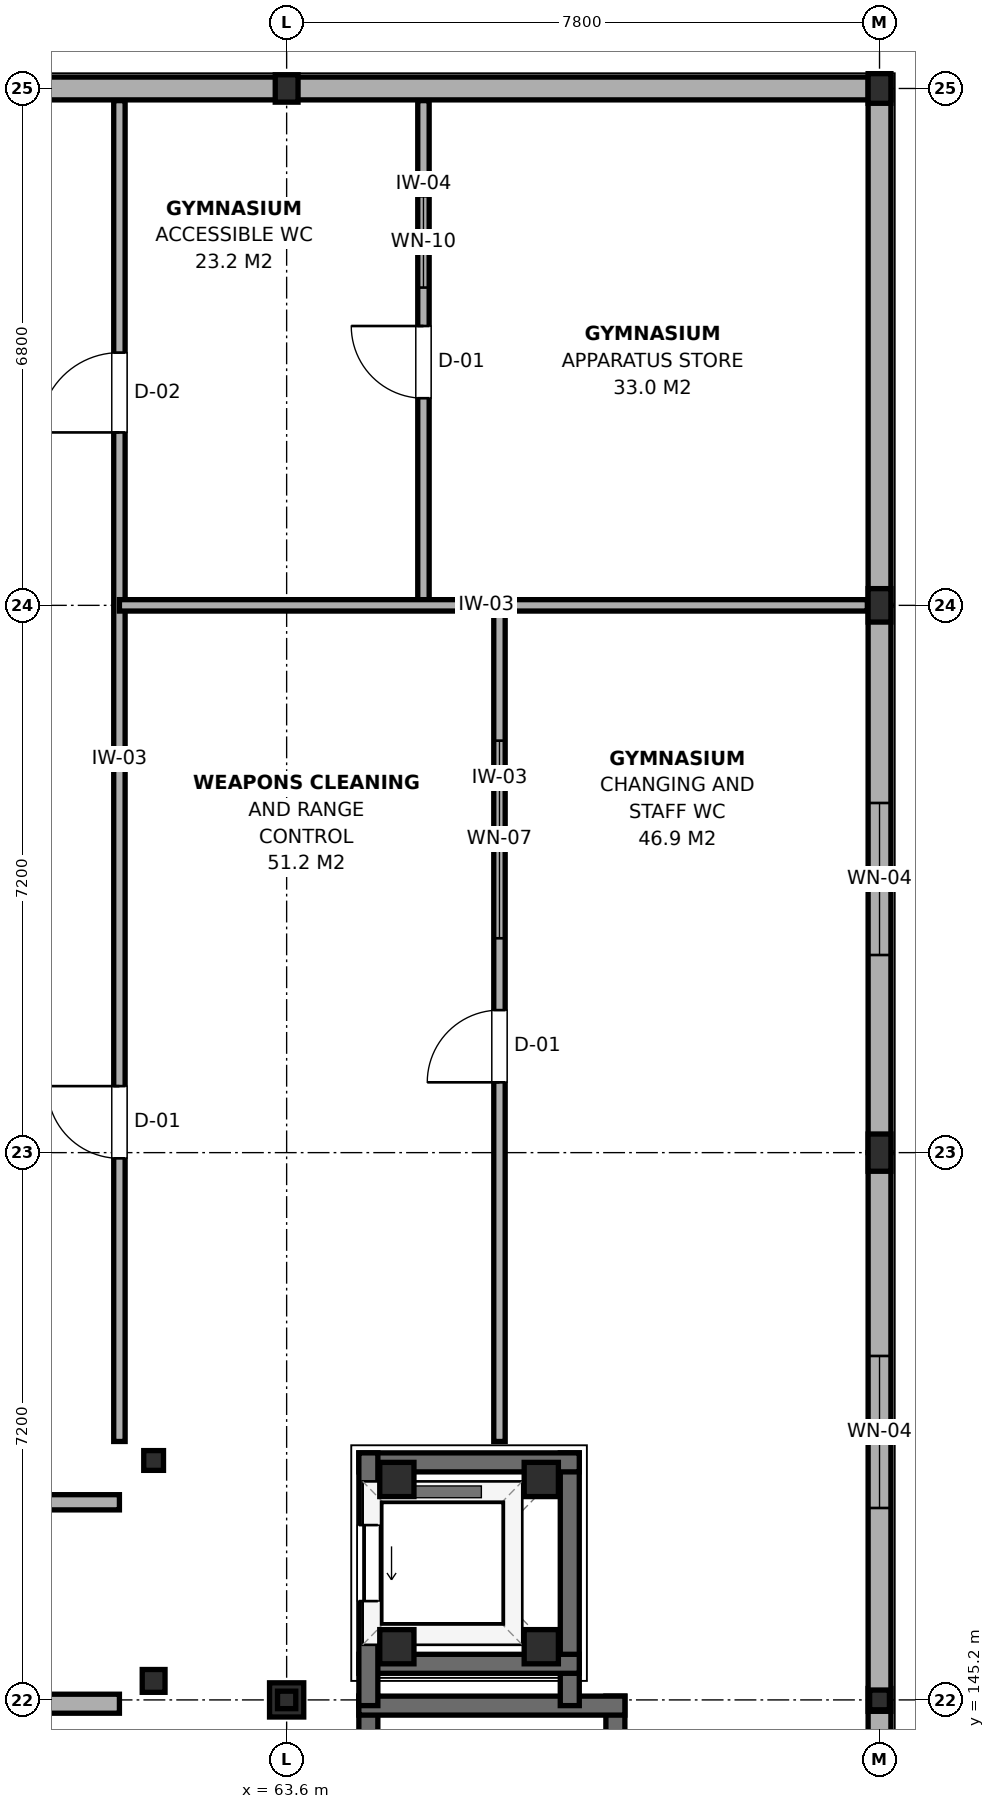
"""IFC4 building model, lengths in metres.
Left out: names, types, materials, properties, quantities, classifications, styles, units other than length and angle.
Written with IfcOpenShell. Run it as: python <this file> out.ifc"""

import sys

from ifc_helpers import new_model, si_unit, direction, frame, frame_2d, origin, origin_2d, place, context, subcontext, project, spatial, rectangle, i_section, extrude, element, fill, save


model = new_model("IFC4")
c1 = context("Model", 3, precision=1e-05, world=origin(), true_north=direction((0.0, 1.0)))
c2 = subcontext(c1, "Body", "Model", "MODEL_VIEW")
j1 = project(units=[si_unit("LENGTHUNIT", "METRE"), si_unit("PLANEANGLEUNIT", "RADIAN")], contexts=[c1])
p1 = place(None, origin())
s1 = spatial("IfcSite", under=j1, at=p1, CompositionType="ELEMENT")
p2 = place(p1, origin())
s2 = spatial("IfcBuilding", under=s1, at=p2, CompositionType="ELEMENT")
p3 = place(p2, origin())
s3 = spatial("IfcBuildingStorey", under=s2, at=p3, CompositionType="ELEMENT", Elevation=0.0)
for number, where, z_axis, x_axis in (
    (1, (65.05, 145.9, -2.15), (0.0, 0.0, 1.0), (1.0, 0.0, 0.0)),
    (2, (66.95, 145.9, -2.15), (0.0, 0.0, 1.0), (1.0, 0.0, 0.0)),
    (3, (65.05, 148.1, -2.15), (0.0, 0.0, 1.0), (1.0, 0.0, 0.0)),
    (4, (66.95, 148.1, -2.15), (0.0, 0.0, 1.0), (1.0, 0.0, 0.0)),
):
    element("IfcColumn", number, at=place(p3, frame(where, z_axis=z_axis, x_axis=x_axis)), inside=s3, PredefinedType="COLUMN", context=c2, shape_type="SweptSolid", body=[
        extrude(rectangle(XDim=0.45, YDim=0.45, at=origin_2d()), origin(), (0.0, 0.0, 1.0), 0.3),
    ])
p4 = place(p3, frame((63.6, 145.2, -2.15), z_axis=(0.0, 0.0, 1.0), x_axis=(1.0, 0.0, 0.0)))
e5 = element("IfcColumn", 5, at=p4, inside=s3, PredefinedType="COLUMN", context=c2, shape_type="SweptSolid", body=[
    extrude(rectangle(XDim=0.45, YDim=0.45, at=origin_2d()), origin(), (0.0, 0.0, 1.0), 1.87),
])
p5 = place(p3, frame((61.85, 145.45, 0.0), z_axis=(0.0, 0.0, 1.0), x_axis=(1.0, 0.0, 0.0)))
e6 = element("IfcColumn", 6, at=p5, inside=s3, PredefinedType="COLUMN", context=c2, shape_type="SweptSolid", body=[
    extrude(i_section(OverallWidth=0.3, OverallDepth=0.3, WebThickness=0.011, FlangeThickness=0.019, FilletRadius=0.027, at=origin_2d()), origin(), (0.0, 0.0, 1.0), 4.56),
])
p6 = place(p3, frame((61.85, 148.35, 0.0), z_axis=(0.0, 0.0, 1.0), x_axis=(1.0, 0.0, 0.0)))
e7 = element("IfcColumn", 7, at=p6, inside=s3, PredefinedType="COLUMN", context=c2, shape_type="SweptSolid", body=[
    extrude(i_section(OverallWidth=0.26, OverallDepth=0.26, WebThickness=0.01, FlangeThickness=0.018, FilletRadius=0.024, at=origin_2d()), origin(), (0.0, 0.0, 1.0), 4.56),
])
p7 = place(p3, frame((63.6, 145.2, 0.0), z_axis=(0.0, 0.0, 1.0), x_axis=(1.0, 0.0, 0.0)))
e8 = element("IfcColumn", 8, at=p7, inside=s3, PredefinedType="COLUMN", context=c2, shape_type="SweptSolid", body=[
    extrude(i_section(OverallWidth=0.24, OverallDepth=0.23, WebThickness=0.008, FlangeThickness=0.012, FilletRadius=0.021, at=origin_2d()), origin(), (0.0, 0.0, 1.0), 4.56),
])
p8 = place(p3, frame((63.6, 166.4, 0.0), z_axis=(0.0, 0.0, 1.0), x_axis=(1.0, 0.0, 0.0)))
e9 = element("IfcColumn", 9, at=p8, inside=s3, PredefinedType="COLUMN", context=c2, shape_type="SweptSolid", body=[
    extrude(i_section(OverallWidth=0.3, OverallDepth=0.36, WebThickness=0.012, FlangeThickness=0.022, FilletRadius=0.027, at=origin_2d()), origin(), (0.0, 0.0, 1.0), 4.8),
])
p9 = place(p3, frame((71.4, 145.2, 0.0), z_axis=(0.0, 0.0, 1.0), x_axis=(1.0, 0.0, 0.0)))
e10 = element("IfcColumn", 10, at=p9, inside=s3, PredefinedType="COLUMN", context=c2, shape_type="SweptSolid", body=[
    extrude(i_section(OverallWidth=0.26, OverallDepth=0.26, WebThickness=0.01, FlangeThickness=0.018, FilletRadius=0.024, at=origin_2d()), origin(), (0.0, 0.0, 1.0), 4.56),
])
p10 = place(p3, frame((71.4, 152.4, 0.0), z_axis=(0.0, 0.0, 1.0), x_axis=(1.0, 0.0, 0.0)))
e11 = element("IfcColumn", 11, at=p10, inside=s3, PredefinedType="COLUMN", context=c2, shape_type="SweptSolid", body=[
    extrude(i_section(OverallWidth=0.3, OverallDepth=0.49, WebThickness=0.012, FlangeThickness=0.023, FilletRadius=0.027, at=origin_2d()), origin(), (0.0, 0.0, 1.0), 4.8),
])
p11 = place(p3, frame((71.4, 159.6, 0.0), z_axis=(0.0, 0.0, 1.0), x_axis=(1.0, 0.0, 0.0)))
e12 = element("IfcColumn", 12, at=p11, inside=s3, PredefinedType="COLUMN", context=c2, shape_type="SweptSolid", body=[
    extrude(i_section(OverallWidth=0.3, OverallDepth=0.44, WebThickness=0.011, FlangeThickness=0.021, FilletRadius=0.027, at=origin_2d()), origin(), (0.0, 0.0, 1.0), 4.8),
])
p12 = place(p3, frame((71.4, 166.4, 0.0), z_axis=(0.0, 0.0, 1.0), x_axis=(1.0, 0.0, 0.0)))
e13 = element("IfcColumn", 13, at=p12, inside=s3, PredefinedType="COLUMN", context=c2, shape_type="SweptSolid", body=[
    extrude(i_section(OverallWidth=0.3, OverallDepth=0.39, WebThickness=0.011, FlangeThickness=0.019, FilletRadius=0.027, at=origin_2d()), origin(), (0.0, 0.0, 1.0), 4.8),
])
p13 = place(p3, frame((60.0, 166.4, 0.0), z_axis=(0.0, 0.0, 1.0), x_axis=(1.0, 0.0, 0.0)))
e14 = element("IfcWall", 14, at=p13, inside=s3, PredefinedType="SOLIDWALL", context=c2, shape_type="SweptSolid", body=[
    extrude(rectangle(XDim=3.6, YDim=0.3, at=frame_2d((1.8, 0.0))), origin(), (0.0, 0.0, 1.0), 4.56),
])
p14 = place(p3, frame((63.6, 166.4, 0.0), z_axis=(0.0, 0.0, 1.0), x_axis=(1.0, 0.0, 0.0)))
e15 = element("IfcWall", 15, at=p14, inside=s3, PredefinedType="SOLIDWALL", context=c2, shape_type="SweptSolid", body=[
    extrude(rectangle(XDim=7.95, YDim=0.3, at=frame_2d((3.975, 0.0))), origin(), (0.0, 0.0, 1.0), 4.56),
])
p15 = place(p3, frame((71.4, 137.85, 0.0), z_axis=(0.0, 0.0, 1.0), x_axis=(0.0, 1.0, 0.0)))
e16 = element("IfcWall", 16, at=p15, inside=s3, PredefinedType="SOLIDWALL", context=c2, shape_type="SweptSolid", body=[
    extrude(rectangle(XDim=7.5, YDim=0.3, at=frame_2d((3.75, 0.0))), origin(), (0.0, 0.0, 1.0), 3.955),
])
p16 = place(p15, frame((2.75, 0.0, 1.1)))
e17 = element("IfcOpeningElement", 17, at=p16, cuts=e16, PredefinedType="OPENING", context=c2, shape_type="SweptSolid", body=[
    extrude(rectangle(XDim=2.0, YDim=1.8, at=frame_2d((1.0, 0.9))), frame((0.0, 0.165, 0.0), z_axis=(0.0, -1.0, 0.0), x_axis=(1.0, 0.0, 0.0)), (0.0, 0.0, 1.0), 0.33),
])
p17 = place(p3, frame((71.4, 145.05, 0.0), z_axis=(0.0, 0.0, 1.0), x_axis=(0.0, 1.0, 0.0)))
e18 = element("IfcWall", 18, at=p17, inside=s3, PredefinedType="SOLIDWALL", context=c2, shape_type="SweptSolid", body=[
    extrude(rectangle(XDim=7.35, YDim=0.3, at=frame_2d((3.675, 0.0))), origin(), (0.0, 0.0, 1.0), 3.955),
])
p18 = place(p17, frame((2.675, 0.0, 1.1)))
e19 = element("IfcOpeningElement", 19, at=p18, cuts=e18, PredefinedType="OPENING", context=c2, shape_type="SweptSolid", body=[
    extrude(rectangle(XDim=2.0, YDim=1.8, at=frame_2d((1.0, 0.9))), frame((0.0, 0.165, 0.0), z_axis=(0.0, -1.0, 0.0), x_axis=(1.0, 0.0, 0.0)), (0.0, 0.0, 1.0), 0.33),
])
p19 = place(p3, frame((71.4, 152.4, 0.0), z_axis=(0.0, 0.0, 1.0), x_axis=(0.0, 1.0, 0.0)))
e20 = element("IfcWall", 20, at=p19, inside=s3, PredefinedType="SOLIDWALL", context=c2, shape_type="SweptSolid", body=[
    extrude(rectangle(XDim=7.2, YDim=0.3, at=frame_2d((3.6, 0.0))), origin(), (0.0, 0.0, 1.0), 4.56),
])
p20 = place(p19, frame((2.6, 0.0, 1.1)))
e21 = element("IfcOpeningElement", 21, at=p20, cuts=e20, PredefinedType="OPENING", context=c2, shape_type="SweptSolid", body=[
    extrude(rectangle(XDim=2.0, YDim=1.8, at=frame_2d((1.0, 0.9))), frame((0.0, 0.165, 0.0), z_axis=(0.0, -1.0, 0.0), x_axis=(1.0, 0.0, 0.0)), (0.0, 0.0, 1.0), 0.33),
])
p21 = place(p3, frame((71.4, 159.6, 0.0), z_axis=(0.0, 0.0, 1.0), x_axis=(0.0, 1.0, 0.0)))
e22 = element("IfcWall", 22, at=p21, inside=s3, PredefinedType="SOLIDWALL", context=c2, shape_type="SweptSolid", body=[
    extrude(rectangle(XDim=6.95, YDim=0.3, at=frame_2d((3.475, 0.0))), origin(), (0.0, 0.0, 1.0), 4.56),
])
p22 = place(p3, frame((64.675, 138.35, 0.0), z_axis=(0.0, 0.0, 1.0), x_axis=(0.0, 1.0, 0.0)))
e23 = element("IfcWall", 23, at=p22, inside=s3, PredefinedType="SHEAR", context=c2, shape_type="SweptSolid", body=[
    extrude(rectangle(XDim=6.9, YDim=0.25, at=frame_2d((3.45, 0.0))), origin(), (0.0, 0.0, 1.0), 4.56),
])
p23 = place(p22, frame((0.42, 0.0, 0.0)))
e24 = element("IfcOpeningElement", 24, at=p23, cuts=e23, PredefinedType="OPENING", context=c2, shape_type="SweptSolid", body=[
    extrude(rectangle(XDim=1.1, YDim=2.15, at=frame_2d((0.55, 1.075))), frame((0.0, 0.14, 0.0), z_axis=(0.0, -1.0, 0.0), x_axis=(1.0, 0.0, 0.0)), (0.0, 0.0, 1.0), 0.28),
])
p24 = place(p3, frame((67.925, 138.35, 0.0), z_axis=(0.0, 0.0, 1.0), x_axis=(0.0, 1.0, 0.0)))
e25 = element("IfcWall", 25, at=p24, inside=s3, PredefinedType="SHEAR", context=c2, shape_type="SweptSolid", body=[
    extrude(rectangle(XDim=6.9, YDim=0.25, at=frame_2d((3.45, 0.0))), origin(), (0.0, 0.0, 1.0), 4.56),
])
p25 = place(p3, frame((64.55, 145.125, 0.0), z_axis=(0.0, 0.0, 1.0), x_axis=(1.0, 0.0, 0.0)))
e26 = element("IfcWall", 26, at=p25, inside=s3, PredefinedType="SHEAR", context=c2, shape_type="SweptSolid", body=[
    extrude(rectangle(XDim=3.5, YDim=0.25, at=frame_2d((1.75, 0.0))), origin(), (0.0, 0.0, 1.0), 4.56),
])
p26 = place(p3, frame((67.325, 145.125, -1.4), z_axis=(0.0, 0.0, 1.0), x_axis=(0.0, 1.0, 0.0)))
e27 = element("IfcWall", 27, at=p26, inside=s3, PredefinedType="SHEAR", context=c2, shape_type="SweptSolid", body=[
    extrude(rectangle(XDim=3.325, YDim=0.25, at=frame_2d((1.663, 0.0))), origin(), (0.0, 0.0, 1.0), 5.96),
])
for number, where, z_axis, x_axis in (
    (28, (64.55, 145.675, -1.4), (0.0, 0.0, 1.0), (1.0, 0.0, 0.0)),
    (29, (64.55, 148.325, -1.4), (0.0, 0.0, 1.0), (1.0, 0.0, 0.0)),
):
    element("IfcWall", number, at=place(p3, frame(where, z_axis=z_axis, x_axis=x_axis)), inside=s3, PredefinedType="SHEAR", context=c2, shape_type="SweptSolid", body=[
        extrude(rectangle(XDim=2.9, YDim=0.25, at=frame_2d((1.45, 0.0))), origin(), (0.0, 0.0, 1.0), 5.96),
    ])
p27 = place(p3, frame((64.675, 145.125, -1.4), z_axis=(0.0, 0.0, 1.0), x_axis=(0.0, 1.0, 0.0)))
e30 = element("IfcWall", 30, at=p27, inside=s3, PredefinedType="SHEAR", context=c2, shape_type="SweptSolid", body=[
    extrude(rectangle(XDim=3.325, YDim=0.25, at=frame_2d((1.663, 0.0))), origin(), (0.0, 0.0, 1.0), 5.96),
])
p28 = place(p27, frame((1.375, 0.0, 1.4)))
e31 = element("IfcOpeningElement", 31, at=p28, cuts=e30, PredefinedType="OPENING", context=c2, shape_type="SweptSolid", body=[
    extrude(rectangle(XDim=1.0, YDim=2.15, at=frame_2d((0.5, 1.075))), frame((0.0, 0.14, 0.0), z_axis=(0.0, -1.0, 0.0), x_axis=(1.0, 0.0, 0.0)), (0.0, 0.0, 1.0), 0.28),
])
p29 = place(p3, frame((61.4, 148.6, 0.0), z_axis=(0.0, 0.0, 1.0), x_axis=(0.0, 1.0, 0.0)))
e32 = element("IfcWall", 32, at=p29, inside=s3, PredefinedType="PARTITIONING", context=c2, shape_type="SweptSolid", body=[
    extrude(rectangle(XDim=17.64, YDim=0.15, at=frame_2d((8.82, 0.0))), origin(), (0.0, 0.0, 1.0), 4.555),
])
p30 = place(p29, frame((3.725, 0.0, 0.0)))
e33 = element("IfcOpeningElement", 33, at=p30, cuts=e32, PredefinedType="OPENING", context=c2, shape_type="SweptSolid", body=[
    extrude(rectangle(XDim=0.95, YDim=2.15, at=frame_2d((0.475, 1.075))), frame((0.0, 0.09, 0.0), z_axis=(0.0, -1.0, 0.0), x_axis=(1.0, 0.0, 0.0)), (0.0, 0.0, 1.0), 0.18),
])
p31 = place(p29, frame((13.275, 0.0, 0.0)))
e34 = element("IfcOpeningElement", 34, at=p31, cuts=e32, PredefinedType="OPENING", context=c2, shape_type="SweptSolid", body=[
    extrude(rectangle(XDim=1.05, YDim=2.15, at=frame_2d((0.525, 1.075))), frame((0.0, 0.09, 0.0), z_axis=(0.0, -1.0, 0.0), x_axis=(1.0, 0.0, 0.0)), (0.0, 0.0, 1.0), 0.18),
])
p32 = place(p3, frame((65.4, 159.6, 0.0), z_axis=(0.0, 0.0, 1.0), x_axis=(0.0, 1.0, 0.0)))
e35 = element("IfcWall", 35, at=p32, inside=s3, PredefinedType="PARTITIONING", context=c2, shape_type="SweptSolid", body=[
    extrude(rectangle(XDim=6.64, YDim=0.15, at=frame_2d((3.32, 0.0))), origin(), (0.0, 0.0, 1.0), 4.555),
])
p33 = place(p32, frame((2.725, 0.0, 0.0)))
e36 = element("IfcOpeningElement", 36, at=p33, cuts=e35, PredefinedType="OPENING", context=c2, shape_type="SweptSolid", body=[
    extrude(rectangle(XDim=0.95, YDim=2.15, at=frame_2d((0.475, 1.075))), frame((0.0, 0.09, 0.0), z_axis=(0.0, -1.0, 0.0), x_axis=(1.0, 0.0, 0.0)), (0.0, 0.0, 1.0), 0.18),
])
p34 = place(p32, frame((4.181, 0.0, 0.95)))
e37 = element("IfcOpeningElement", 37, at=p34, cuts=e35, PredefinedType="OPENING", context=c2, shape_type="SweptSolid", body=[
    extrude(rectangle(XDim=1.2, YDim=1.5, at=frame_2d((0.6, 0.75))), frame((0.0, 0.09, 0.0), z_axis=(0.0, -1.0, 0.0), x_axis=(1.0, 0.0, 0.0)), (0.0, 0.0, 1.0), 0.18),
])
p35 = place(p3, frame((66.4, 148.6, 0.0), z_axis=(0.0, 0.0, 1.0), x_axis=(0.0, 1.0, 0.0)))
e38 = element("IfcWall", 38, at=p35, inside=s3, PredefinedType="PARTITIONING", context=c2, shape_type="SweptSolid", body=[
    extrude(rectangle(XDim=11.0, YDim=0.15, at=frame_2d((5.5, 0.0))), origin(), (0.0, 0.0, 1.0), 4.555),
])
p36 = place(p35, frame((4.725, 0.0, 0.0)))
e39 = element("IfcOpeningElement", 39, at=p36, cuts=e38, PredefinedType="OPENING", context=c2, shape_type="SweptSolid", body=[
    extrude(rectangle(XDim=0.95, YDim=2.15, at=frame_2d((0.475, 1.075))), frame((0.0, 0.09, 0.0), z_axis=(0.0, -1.0, 0.0), x_axis=(1.0, 0.0, 0.0)), (0.0, 0.0, 1.0), 0.18),
])
p37 = place(p35, frame((6.62, 0.0, 0.95)))
e40 = element("IfcOpeningElement", 40, at=p37, cuts=e38, PredefinedType="OPENING", context=c2, shape_type="SweptSolid", body=[
    extrude(rectangle(XDim=2.6, YDim=1.5, at=frame_2d((1.3, 0.75))), frame((0.0, 0.09, 0.0), z_axis=(0.0, -1.0, 0.0), x_axis=(1.0, 0.0, 0.0)), (0.0, 0.0, 1.0), 0.18),
])
p38 = place(p3, frame((61.4, 159.6, 0.0), z_axis=(0.0, 0.0, 1.0), x_axis=(1.0, 0.0, 0.0)))
e41 = element("IfcWall", 41, at=p38, inside=s3, PredefinedType="PARTITIONING", context=c2, shape_type="SweptSolid", body=[
    extrude(rectangle(XDim=9.84, YDim=0.15, at=frame_2d((4.92, 0.0))), origin(), (0.0, 0.0, 1.0), 4.555),
])
p39 = place(p3, frame((33.8, 145.15, 0.0), z_axis=(0.0, 0.0, 1.0), x_axis=(1.0, 0.0, 0.0)))
e42 = element("IfcWall", 42, at=p39, inside=s3, PredefinedType="PARTITIONING", context=c2, shape_type="SweptSolid", body=[
    extrude(rectangle(XDim=27.6, YDim=0.25, at=frame_2d((13.8, 0.0))), origin(), (0.0, 0.0, 1.0), 3.955),
])
p40 = place(p39, frame((8.65, 0.0, 0.0)))
e43 = element("IfcOpeningElement", 43, at=p40, cuts=e42, PredefinedType="OPENING", context=c2, shape_type="SweptSolid", body=[
    extrude(rectangle(XDim=1.5, YDim=2.15, at=frame_2d((0.75, 1.075))), frame((0.0, 0.14, 0.0), z_axis=(0.0, -1.0, 0.0), x_axis=(1.0, 0.0, 0.0)), (0.0, 0.0, 1.0), 0.28),
])
p41 = place(p39, frame((20.65, 0.0, 0.0)))
e44 = element("IfcOpeningElement", 44, at=p41, cuts=e42, PredefinedType="OPENING", context=c2, shape_type="SweptSolid", body=[
    extrude(rectangle(XDim=1.5, YDim=2.15, at=frame_2d((0.75, 1.075))), frame((0.0, 0.14, 0.0), z_axis=(0.0, -1.0, 0.0), x_axis=(1.0, 0.0, 0.0)), (0.0, 0.0, 1.0), 0.28),
])
p42 = place(p3, frame((30.6, 147.8, 0.0), z_axis=(0.0, 0.0, 1.0), x_axis=(1.0, 0.0, 0.0)))
e45 = element("IfcWall", 45, at=p42, inside=s3, PredefinedType="PARTITIONING", context=c2, shape_type="SweptSolid", body=[
    extrude(rectangle(XDim=30.8, YDim=0.2, at=frame_2d((15.4, 0.0))), origin(), (0.0, 0.0, 1.0), 4.555),
])
p43 = place(p42, frame((5.8, 0.0, 0.0)))
e46 = element("IfcOpeningElement", 46, at=p43, cuts=e45, PredefinedType="OPENING", context=c2, shape_type="SweptSolid", body=[
    extrude(rectangle(XDim=1.6, YDim=2.15, at=frame_2d((0.8, 1.075))), frame((0.0, 0.115, 0.0), z_axis=(0.0, -1.0, 0.0), x_axis=(1.0, 0.0, 0.0)), (0.0, 0.0, 1.0), 0.23),
])
p44 = place(p42, frame((23.8, 0.0, 0.0)))
e47 = element("IfcOpeningElement", 47, at=p44, cuts=e45, PredefinedType="OPENING", context=c2, shape_type="SweptSolid", body=[
    extrude(rectangle(XDim=1.6, YDim=2.15, at=frame_2d((0.8, 1.075))), frame((0.0, 0.115, 0.0), z_axis=(0.0, -1.0, 0.0), x_axis=(1.0, 0.0, 0.0)), (0.0, 0.0, 1.0), 0.23),
])
p45 = place(p18, origin())
e48 = element("IfcWindow", 48, at=p45, inside=s3, PartitioningType="SINGLE_PANEL", PredefinedType="WINDOW", context=c2, shape_type="SweptSolid", body=[
    extrude(rectangle(XDim=2.0, YDim=1.8, at=frame_2d((1.0, 0.9))), frame((0.0, 0.03, 0.0), z_axis=(0.0, -1.0, 0.0), x_axis=(1.0, 0.0, 0.0)), (0.0, 0.0, 1.0), 0.06),
])
fill(e19, e48)
p46 = place(p20, origin())
e49 = element("IfcWindow", 49, at=p46, inside=s3, PartitioningType="SINGLE_PANEL", PredefinedType="WINDOW", context=c2, shape_type="SweptSolid", body=[
    extrude(rectangle(XDim=2.0, YDim=1.8, at=frame_2d((1.0, 0.9))), frame((0.0, 0.03, 0.0), z_axis=(0.0, -1.0, 0.0), x_axis=(1.0, 0.0, 0.0)), (0.0, 0.0, 1.0), 0.06),
])
fill(e21, e49)
p47 = place(p28, origin())
e50 = element("IfcDoor", 50, at=p47, inside=s3, OperationType="SLIDING_TO_LEFT", PredefinedType="DOOR", context=c2, shape_type="SweptSolid", body=[
    extrude(rectangle(XDim=1.0, YDim=2.15, at=frame_2d((0.5, 1.075))), frame((0.0, 0.025, 0.0), z_axis=(0.0, -1.0, 0.0), x_axis=(1.0, 0.0, 0.0)), (0.0, 0.0, 1.0), 0.05),
])
fill(e31, e50)
p48 = place(p30, origin())
e51 = element("IfcDoor", 51, at=p48, inside=s3, OperationType="SINGLE_SWING_RIGHT", PredefinedType="DOOR", context=c2, shape_type="SweptSolid", body=[
    extrude(rectangle(XDim=0.95, YDim=2.15, at=frame_2d((0.475, 1.075))), frame((0.0, 0.025, 0.0), z_axis=(0.0, -1.0, 0.0), x_axis=(1.0, 0.0, 0.0)), (0.0, 0.0, 1.0), 0.05),
])
fill(e33, e51)
p49 = place(p31, origin())
e52 = element("IfcDoor", 52, at=p49, inside=s3, OperationType="SINGLE_SWING_LEFT", PredefinedType="DOOR", context=c2, shape_type="SweptSolid", body=[
    extrude(rectangle(XDim=1.05, YDim=2.15, at=frame_2d((0.525, 1.075))), frame((0.0, 0.025, 0.0), z_axis=(0.0, -1.0, 0.0), x_axis=(1.0, 0.0, 0.0)), (0.0, 0.0, 1.0), 0.05),
])
fill(e34, e52)
p50 = place(p33, origin())
e53 = element("IfcDoor", 53, at=p50, inside=s3, OperationType="SINGLE_SWING_RIGHT", PredefinedType="DOOR", context=c2, shape_type="SweptSolid", body=[
    extrude(rectangle(XDim=0.95, YDim=2.15, at=frame_2d((0.475, 1.075))), frame((0.0, 0.025, 0.0), z_axis=(0.0, -1.0, 0.0), x_axis=(1.0, 0.0, 0.0)), (0.0, 0.0, 1.0), 0.05),
])
fill(e36, e53)
p51 = place(p34, origin())
e54 = element("IfcWindow", 54, at=p51, inside=s3, PartitioningType="SINGLE_PANEL", PredefinedType="WINDOW", context=c2, shape_type="SweptSolid", body=[
    extrude(rectangle(XDim=1.2, YDim=1.5, at=frame_2d((0.6, 0.75))), frame((0.0, 0.03, 0.0), z_axis=(0.0, -1.0, 0.0), x_axis=(1.0, 0.0, 0.0)), (0.0, 0.0, 1.0), 0.06),
])
fill(e37, e54)
p52 = place(p36, origin())
e55 = element("IfcDoor", 55, at=p52, inside=s3, OperationType="SINGLE_SWING_LEFT", PredefinedType="DOOR", context=c2, shape_type="SweptSolid", body=[
    extrude(rectangle(XDim=0.95, YDim=2.15, at=frame_2d((0.475, 1.075))), frame((0.0, 0.025, 0.0), z_axis=(0.0, -1.0, 0.0), x_axis=(1.0, 0.0, 0.0)), (0.0, 0.0, 1.0), 0.05),
])
fill(e39, e55)
p53 = place(p37, origin())
e56 = element("IfcWindow", 56, at=p53, inside=s3, PartitioningType="SINGLE_PANEL", PredefinedType="WINDOW", context=c2, shape_type="SweptSolid", body=[
    extrude(rectangle(XDim=2.6, YDim=1.5, at=frame_2d((1.3, 0.75))), frame((0.0, 0.03, 0.0), z_axis=(0.0, -1.0, 0.0), x_axis=(1.0, 0.0, 0.0)), (0.0, 0.0, 1.0), 0.06),
])
fill(e40, e56)
save(model, sys.argv[1])
